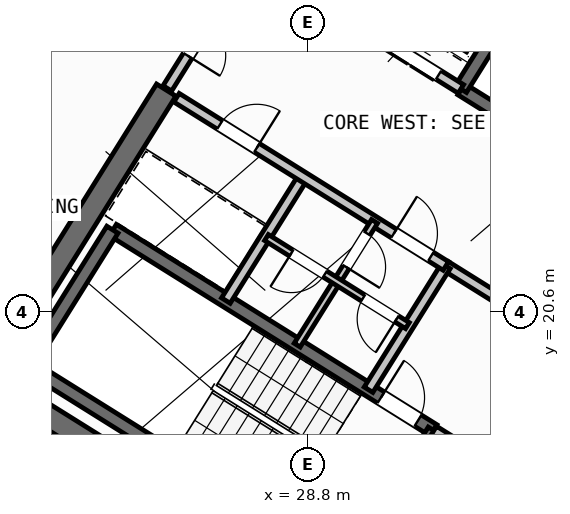
"""IFC4 building model, lengths in metres.
Left out: names, types, materials, properties, quantities, classifications, styles, units other than length and angle.
Written with IfcOpenShell. Run it as: python <this file> out.ifc"""

import sys

from ifc_helpers import new_model, si_unit, direction, frame, frame_2d, origin, place, context, subcontext, project, spatial, rectangle, extrude, source, transform, mapped, element, fill, save


model = new_model("IFC4")
c1 = context("Model", 3, precision=1e-05, world=origin(), true_north=direction((0.0, 1.0)))
c2 = subcontext(c1, "Body", "Model", "MODEL_VIEW")
j1 = project(units=[si_unit("LENGTHUNIT", "METRE"), si_unit("PLANEANGLEUNIT", "RADIAN")], contexts=[c1])
p1 = place(None, origin())
s1 = spatial("IfcSite", under=j1, at=p1, CompositionType="ELEMENT")
p2 = place(p1, origin())
s2 = spatial("IfcBuilding", under=s1, at=p2, CompositionType="ELEMENT")
p3 = place(p2, frame((0.0, 0.0, 259.2)))
s3 = spatial("IfcBuildingStorey", under=s2, at=p3, CompositionType="ELEMENT", Elevation=259.2)
p4 = place(p3, frame((40.531, 24.036, 0.0), z_axis=(0.0, 0.0, 1.0), x_axis=(-0.848048787466, 0.529918157905, 0.0)))
e1 = element("IfcWall", 1, at=p4, inside=s3, PredefinedType="SHEAR", context=c2, shape_type="SweptSolid", body=[
    extrude(rectangle(XDim=13.04, YDim=0.45, at=frame_2d((6.52, 0.0))), origin(), (0.0, 0.0, 1.0), 3.35),
])
p5 = place(p3, frame((33.324, 12.503, 0.0), z_axis=(0.0, 0.0, 1.0), x_axis=(-0.848043529849, 0.529926571782, 0.0)))
e2 = element("IfcWall", 2, at=p5, inside=s3, PredefinedType="SHEAR", context=c2, shape_type="SweptSolid", body=[
    extrude(rectangle(XDim=13.04, YDim=0.45, at=frame_2d((6.52, 0.0))), origin(), (0.0, 0.0, 1.0), 3.35),
])
p6 = place(p3, frame((26.007, 24.976, 0.0), z_axis=(0.0, 0.0, 1.0), x_axis=(-0.529931155655, -0.848040665456, 0.0)))
e3 = element("IfcWall", 3, at=p6, inside=s3, PredefinedType="SHEAR", context=c2, shape_type="SweptSolid", body=[
    extrude(rectangle(XDim=6.475, YDim=0.45, at=frame_2d((3.238, 0.0))), origin(), (0.0, 0.0, 1.0), 3.35),
])
p7 = place(p3, frame((29.268, 6.429, 0.0), z_axis=(0.0, 0.0, 1.0), x_axis=(-0.848049971435, 0.529916263149, 0.0)))
e4 = element("IfcWall", 4, at=p7, inside=s3, PredefinedType="STANDARD", context=c2, shape_type="SweptSolid", body=[
    extrude(rectangle(XDim=31.588, YDim=0.32, at=frame_2d((15.794, 0.0))), origin(), (0.0, 0.0, 1.0), 3.35),
])
p8 = place(p7, frame((16.362, 0.0, 0.0)))
e5 = element("IfcOpeningElement", 5, at=p8, cuts=e4, PredefinedType="OPENING", context=c2, shape_type="SweptSolid", body=[
    extrude(rectangle(XDim=1.2, YDim=2.15, at=frame_2d((0.6, 1.075))), frame((0.0, 0.17, 0.0), z_axis=(0.0, -1.0, 0.0), x_axis=(1.0, 0.0, 0.0)), (0.0, 0.0, 1.0), 0.34),
])
p9 = place(p7, frame((3.859, 0.0, 0.9)))
e6 = element("IfcOpeningElement", 6, at=p9, cuts=e4, PredefinedType="OPENING", context=c2, shape_type="SweptSolid", body=[
    extrude(rectangle(XDim=1.65, YDim=1.45, at=frame_2d((0.825, 0.725))), frame((0.0, 0.17, 0.0), z_axis=(0.0, -1.0, 0.0), x_axis=(1.0, 0.0, 0.0)), (0.0, 0.0, 1.0), 0.34),
])
p10 = place(p7, frame((10.519, 0.0, 0.9)))
e7 = element("IfcOpeningElement", 7, at=p10, cuts=e4, PredefinedType="OPENING", context=c2, shape_type="SweptSolid", body=[
    extrude(rectangle(XDim=1.65, YDim=1.45, at=frame_2d((0.825, 0.725))), frame((0.0, 0.17, 0.0), z_axis=(0.0, -1.0, 0.0), x_axis=(1.0, 0.0, 0.0)), (0.0, 0.0, 1.0), 0.34),
])
p11 = place(p7, frame((28.413, 0.0, 0.95)))
e8 = element("IfcOpeningElement", 8, at=p11, cuts=e4, PredefinedType="OPENING", context=c2, shape_type="SweptSolid", body=[
    extrude(rectangle(XDim=1.95, YDim=1.35, at=frame_2d((0.975, 0.675))), frame((0.0, 0.17, 0.0), z_axis=(0.0, -1.0, 0.0), x_axis=(1.0, 0.0, 0.0)), (0.0, 0.0, 1.0), 0.34),
])
p12 = place(p7, frame((19.699, 0.0, 1.0)))
e9 = element("IfcOpeningElement", 9, at=p12, cuts=e4, PredefinedType="OPENING", context=c2, shape_type="SweptSolid", body=[
    extrude(rectangle(XDim=0.65, YDim=1.15, at=frame_2d((0.325, 0.575))), frame((0.0, 0.17, 0.0), z_axis=(0.0, -1.0, 0.0), x_axis=(1.0, 0.0, 0.0)), (0.0, 0.0, 1.0), 0.34),
])
p13 = place(p7, frame((21.721, 0.0, 1.0)))
e10 = element("IfcOpeningElement", 10, at=p13, cuts=e4, PredefinedType="OPENING", context=c2, shape_type="SweptSolid", body=[
    extrude(rectangle(XDim=0.65, YDim=1.15, at=frame_2d((0.325, 0.575))), frame((0.0, 0.17, 0.0), z_axis=(0.0, -1.0, 0.0), x_axis=(1.0, 0.0, 0.0)), (0.0, 0.0, 1.0), 0.34),
])
p14 = place(p7, frame((23.756, 0.0, 1.0)))
e11 = element("IfcOpeningElement", 11, at=p14, cuts=e4, PredefinedType="OPENING", context=c2, shape_type="SweptSolid", body=[
    extrude(rectangle(XDim=0.65, YDim=1.15, at=frame_2d((0.325, 0.575))), frame((0.0, 0.17, 0.0), z_axis=(0.0, -1.0, 0.0), x_axis=(1.0, 0.0, 0.0)), (0.0, 0.0, 1.0), 0.34),
])
p15 = place(p7, frame((25.791, 0.0, 1.0)))
e12 = element("IfcOpeningElement", 12, at=p15, cuts=e4, PredefinedType="OPENING", context=c2, shape_type="SweptSolid", body=[
    extrude(rectangle(XDim=0.65, YDim=1.15, at=frame_2d((0.325, 0.575))), frame((0.0, 0.17, 0.0), z_axis=(0.0, -1.0, 0.0), x_axis=(1.0, 0.0, 0.0)), (0.0, 0.0, 1.0), 0.34),
])
p16 = place(p3, frame((14.138, 41.825, 0.0), z_axis=(0.0, 0.0, 1.0), x_axis=(0.848046498049, -0.529921821731, 0.0)))
e13 = element("IfcWall", 13, at=p16, inside=s3, PredefinedType="STANDARD", context=c2, shape_type="SweptSolid", body=[
    extrude(rectangle(XDim=31.588, YDim=0.32, at=frame_2d((15.794, 0.0))), origin(), (0.0, 0.0, 1.0), 3.35),
])
p17 = place(p16, frame((9.753, 0.0, 0.0)))
e14 = element("IfcOpeningElement", 14, at=p17, cuts=e13, PredefinedType="OPENING", context=c2, shape_type="SweptSolid", body=[
    extrude(rectangle(XDim=1.05, YDim=2.15, at=frame_2d((0.525, 1.075))), frame((0.0, 0.17, 0.0), z_axis=(0.0, -1.0, 0.0), x_axis=(1.0, 0.0, 0.0)), (0.0, 0.0, 1.0), 0.34),
])
p18 = place(p16, frame((0.816, 0.0, 0.9)))
e15 = element("IfcOpeningElement", 15, at=p18, cuts=e13, PredefinedType="OPENING", context=c2, shape_type="SweptSolid", body=[
    extrude(rectangle(XDim=1.65, YDim=1.45, at=frame_2d((0.825, 0.725))), frame((0.0, 0.17, 0.0), z_axis=(0.0, -1.0, 0.0), x_axis=(1.0, 0.0, 0.0)), (0.0, 0.0, 1.0), 0.34),
])
p19 = place(p16, frame((4.196, 0.0, 1.0)))
e16 = element("IfcOpeningElement", 16, at=p19, cuts=e13, PredefinedType="OPENING", context=c2, shape_type="SweptSolid", body=[
    extrude(rectangle(XDim=0.9, YDim=1.25, at=frame_2d((0.45, 0.625))), frame((0.0, 0.17, 0.0), z_axis=(0.0, -1.0, 0.0), x_axis=(1.0, 0.0, 0.0)), (0.0, 0.0, 1.0), 0.34),
])
p20 = place(p16, frame((7.188, 0.0, 0.95)))
e17 = element("IfcOpeningElement", 17, at=p20, cuts=e13, PredefinedType="OPENING", context=c2, shape_type="SweptSolid", body=[
    extrude(rectangle(XDim=1.95, YDim=1.35, at=frame_2d((0.975, 0.675))), frame((0.0, 0.17, 0.0), z_axis=(0.0, -1.0, 0.0), x_axis=(1.0, 0.0, 0.0)), (0.0, 0.0, 1.0), 0.34),
])
p21 = place(p16, frame((14.124, 0.0, 1.0)))
e18 = element("IfcOpeningElement", 18, at=p21, cuts=e13, PredefinedType="OPENING", context=c2, shape_type="SweptSolid", body=[
    extrude(rectangle(XDim=0.9, YDim=1.25, at=frame_2d((0.45, 0.625))), frame((0.0, 0.17, 0.0), z_axis=(0.0, -1.0, 0.0), x_axis=(1.0, 0.0, 0.0)), (0.0, 0.0, 1.0), 0.34),
])
p22 = place(p16, frame((17.154, 0.0, 1.0)))
e19 = element("IfcOpeningElement", 19, at=p22, cuts=e13, PredefinedType="OPENING", context=c2, shape_type="SweptSolid", body=[
    extrude(rectangle(XDim=0.9, YDim=1.25, at=frame_2d((0.45, 0.625))), frame((0.0, 0.17, 0.0), z_axis=(0.0, -1.0, 0.0), x_axis=(1.0, 0.0, 0.0)), (0.0, 0.0, 1.0), 0.34),
])
p23 = place(p16, frame((21.869, 0.0, 0.9)))
e20 = element("IfcOpeningElement", 20, at=p23, cuts=e13, PredefinedType="OPENING", context=c2, shape_type="SweptSolid", body=[
    extrude(rectangle(XDim=1.35, YDim=1.45, at=frame_2d((0.675, 0.725))), frame((0.0, 0.17, 0.0), z_axis=(0.0, -1.0, 0.0), x_axis=(1.0, 0.0, 0.0)), (0.0, 0.0, 1.0), 0.34),
])
p24 = place(p16, frame((27.569, 0.0, 0.9)))
e21 = element("IfcOpeningElement", 21, at=p24, cuts=e13, PredefinedType="OPENING", context=c2, shape_type="SweptSolid", body=[
    extrude(rectangle(XDim=1.35, YDim=1.45, at=frame_2d((0.675, 0.725))), frame((0.0, 0.17, 0.0), z_axis=(0.0, -1.0, 0.0), x_axis=(1.0, 0.0, 0.0)), (0.0, 0.0, 1.0), 0.34),
])
p25 = place(p3, frame((29.605, 15.581, 0.0), z_axis=(0.0, 0.0, 1.0), x_axis=(-0.848036911448, 0.529937163087, 0.0)))
e22 = element("IfcWall", 22, at=p25, inside=s3, PredefinedType="SHEAR", context=c2, shape_type="SweptSolid", body=[
    extrude(rectangle(XDim=7.46, YDim=0.26, at=frame_2d((3.73, 0.0))), origin(), (0.0, 0.0, 1.0), 3.35),
])
p26 = place(p3, frame((31.28, 18.261, 0.0), z_axis=(0.0, 0.0, 1.0), x_axis=(-0.848051618787, 0.529913626805, 0.0)))
e23 = element("IfcWall", 23, at=p26, inside=s3, PredefinedType="SHEAR", context=c2, shape_type="SweptSolid", body=[
    extrude(rectangle(XDim=7.46, YDim=0.26, at=frame_2d((3.73, 0.0))), origin(), (0.0, 0.0, 1.0), 3.35),
])
p27 = place(p26, frame((0.36, 0.0, 0.0)))
e24 = element("IfcOpeningElement", 24, at=p27, cuts=e23, PredefinedType="OPENING", context=c2, shape_type="SweptSolid", body=[
    extrude(rectangle(XDim=0.86, YDim=2.05, at=frame_2d((0.43, 1.025))), frame((0.0, 0.14, 0.0), z_axis=(0.0, -1.0, 0.0), x_axis=(1.0, 0.0, 0.0)), (0.0, 0.0, 1.0), 0.28),
])
p28 = place(p3, frame((31.288, 18.256, 0.0), z_axis=(0.0, 0.0, 1.0), x_axis=(-0.529943379326, -0.848033026897, 0.0)))
e25 = element("IfcWall", 25, at=p28, inside=s3, PredefinedType="SHEAR", context=c2, shape_type="SweptSolid", body=[
    extrude(rectangle(XDim=3.16, YDim=0.26, at=frame_2d((1.58, 0.0))), origin(), (0.0, 0.0, 1.0), 3.35),
])
p29 = place(p3, frame((24.945, 22.22, 0.0), z_axis=(0.0, 0.0, 1.0), x_axis=(-0.529908658664, -0.84805472316, 0.0)))
e26 = element("IfcWall", 26, at=p29, inside=s3, PredefinedType="SHEAR", context=c2, shape_type="SweptSolid", body=[
    extrude(rectangle(XDim=3.16, YDim=0.26, at=frame_2d((1.58, 0.0))), origin(), (0.0, 0.0, 1.0), 3.35),
])
p30 = place(p3, frame((38.046, 21.108, 0.0), z_axis=(0.0, 0.0, 1.0), x_axis=(-0.848054434086, 0.529909121291, 0.0)))
e27 = element("IfcWall", 27, at=p30, inside=s3, PredefinedType="SHEAR", context=c2, shape_type="SweptSolid", body=[
    extrude(rectangle(XDim=7.33, YDim=0.26, at=frame_2d((3.665, 0.0))), origin(), (0.0, 0.0, 1.0), 3.35),
])
p31 = place(p30, frame((0.22, 0.0, 0.0)))
e28 = element("IfcOpeningElement", 28, at=p31, cuts=e27, PredefinedType="OPENING", context=c2, shape_type="SweptSolid", body=[
    extrude(rectangle(XDim=1.1, YDim=2.1, at=frame_2d((0.55, 1.05))), frame((0.0, 0.14, 0.0), z_axis=(0.0, -1.0, 0.0), x_axis=(1.0, 0.0, 0.0)), (0.0, 0.0, 1.0), 0.28),
])
p32 = place(p3, frame((33.496, 27.677, 0.0), z_axis=(0.0, 0.0, 1.0), x_axis=(-0.529908658664, -0.84805472316, 0.0)))
e29 = element("IfcWall", 29, at=p32, inside=s3, PredefinedType="SHEAR", context=c2, shape_type="SweptSolid", body=[
    extrude(rectangle(XDim=3.16, YDim=0.26, at=frame_2d((1.58, 0.0))), origin(), (0.0, 0.0, 1.0), 3.35),
])
p33 = place(p3, frame((34.933, 15.978, 0.0), z_axis=(0.0, 0.0, 1.0), x_axis=(-0.848055739377, 0.529907032327, 0.0)))
e30 = element("IfcWall", 30, at=p33, inside=s3, PredefinedType="STANDARD", context=c2, shape_type="SweptSolid", body=[
    extrude(rectangle(XDim=4.298, YDim=0.2, at=frame_2d((2.149, 0.0))), origin(), (0.0, 0.0, 1.0), 3.34),
])
p34 = place(p33, frame((0.448, 0.0, 0.0)))
e31 = element("IfcOpeningElement", 31, at=p34, cuts=e30, PredefinedType="OPENING", context=c2, shape_type="SweptSolid", body=[
    extrude(rectangle(XDim=1.3, YDim=2.2, at=frame_2d((0.65, 1.1))), frame((0.0, 0.11, 0.0), z_axis=(0.0, -1.0, 0.0), x_axis=(1.0, 0.0, 0.0)), (0.0, 0.0, 1.0), 0.22),
])
p35 = place(p33, frame((2.523, 0.0, 0.0)))
e32 = element("IfcOpeningElement", 32, at=p35, cuts=e30, PredefinedType="OPENING", context=c2, shape_type="SweptSolid", body=[
    extrude(rectangle(XDim=1.45, YDim=2.25, at=frame_2d((0.725, 1.125))), frame((0.0, 0.11, 0.0), z_axis=(0.0, -1.0, 0.0), x_axis=(1.0, 0.0, 0.0)), (0.0, 0.0, 1.0), 0.22),
])
p36 = place(p3, frame((36.459, 18.421, 0.0), z_axis=(0.0, 0.0, 1.0), x_axis=(-0.848059591691, 0.529900867089, 0.0)))
e33 = element("IfcWall", 33, at=p36, inside=s3, PredefinedType="STANDARD", context=c2, shape_type="SweptSolid", body=[
    extrude(rectangle(XDim=5.818, YDim=0.2, at=frame_2d((2.909, 0.0))), origin(), (0.0, 0.0, 1.0), 3.34),
])
p37 = place(p36, frame((2.598, 0.0, 0.0)))
e34 = element("IfcOpeningElement", 34, at=p37, cuts=e33, PredefinedType="OPENING", context=c2, shape_type="SweptSolid", body=[
    extrude(rectangle(XDim=1.15, YDim=2.1, at=frame_2d((0.575, 1.05))), frame((0.0, 0.11, 0.0), z_axis=(0.0, -1.0, 0.0), x_axis=(1.0, 0.0, 0.0)), (0.0, 0.0, 1.0), 0.22),
])
p38 = place(p3, frame((31.822, 24.998, 0.0), z_axis=(0.0, 0.0, 1.0), x_axis=(-0.848054125777, 0.529909614701, 0.0)))
e35 = element("IfcWall", 35, at=p38, inside=s3, PredefinedType="STANDARD", context=c2, shape_type="SweptSolid", body=[
    extrude(rectangle(XDim=4.668, YDim=0.2, at=frame_2d((2.334, 0.0))), origin(), (0.0, 0.0, 1.0), 3.34),
])
p39 = place(p38, frame((0.52, 0.0, 0.0)))
e36 = element("IfcOpeningElement", 36, at=p39, cuts=e35, PredefinedType="OPENING", context=c2, shape_type="SweptSolid", body=[
    extrude(rectangle(XDim=1.2, YDim=2.15, at=frame_2d((0.6, 1.075))), frame((0.0, 0.11, 0.0), z_axis=(0.0, -1.0, 0.0), x_axis=(1.0, 0.0, 0.0)), (0.0, 0.0, 1.0), 0.22),
])
p40 = place(p38, frame((2.54, 0.0, 0.0)))
e37 = element("IfcOpeningElement", 37, at=p40, cuts=e35, PredefinedType="OPENING", context=c2, shape_type="SweptSolid", body=[
    extrude(rectangle(XDim=1.2, YDim=2.15, at=frame_2d((0.6, 1.075))), frame((0.0, 0.11, 0.0), z_axis=(0.0, -1.0, 0.0), x_axis=(1.0, 0.0, 0.0)), (0.0, 0.0, 1.0), 0.22),
])
for number, where, z_axis, x_axis in (
    (38, (31.525, 21.504, 0.0), (0.0, 0.0, 1.0), (-0.53, -0.848, 0.0)),
    (39, (28.71, 23.263, 0.0), (0.0, 0.0, 1.0), (-0.53, -0.848, 0.0)),
):
    element("IfcWall", number, at=place(p3, frame(where, z_axis=z_axis, x_axis=x_axis)), inside=s3, PredefinedType="STANDARD", context=c2, shape_type="SweptSolid", body=[
        extrude(rectangle(XDim=2.88, YDim=0.2, at=frame_2d((1.44, 0.0))), origin(), (0.0, 0.0, 1.0), 3.34),
    ])
p41 = place(p3, frame((31.525, 21.504, 0.0), z_axis=(0.0, 0.0, 1.0), x_axis=(-0.848042066329, 0.529928913853, 0.0)))
e40 = element("IfcWall", 40, at=p41, inside=s3, PredefinedType="STANDARD", context=c2, shape_type="SweptSolid", body=[
    extrude(rectangle(XDim=6.268, YDim=0.2, at=frame_2d((3.134, 0.0))), origin(), (0.0, 0.0, 1.0), 3.34),
])
p42 = place(p41, frame((4.4, 0.0, 0.0)))
e41 = element("IfcOpeningElement", 41, at=p42, cuts=e40, PredefinedType="OPENING", context=c2, shape_type="SweptSolid", body=[
    extrude(rectangle(XDim=0.86, YDim=2.05, at=frame_2d((0.43, 1.025))), frame((0.0, 0.11, 0.0), z_axis=(0.0, -1.0, 0.0), x_axis=(1.0, 0.0, 0.0)), (0.0, 0.0, 1.0), 0.22),
])
p43 = place(p41, frame((0.35, 0.0, 0.0)))
e42 = element("IfcOpeningElement", 42, at=p43, cuts=e40, PredefinedType="OPENING", context=c2, shape_type="SweptSolid", body=[
    extrude(rectangle(XDim=0.86, YDim=2.05, at=frame_2d((0.43, 1.025))), frame((0.0, 0.11, 0.0), z_axis=(0.0, -1.0, 0.0), x_axis=(1.0, 0.0, 0.0)), (0.0, 0.0, 1.0), 0.22),
])
p44 = place(p3, frame((30.117, 22.384, 0.0), z_axis=(0.0, 0.0, 1.0), x_axis=(-0.529951914384, -0.848027693204, 0.0)))
e43 = element("IfcWall", 43, at=p44, inside=s3, PredefinedType="PLUMBINGWALL", context=c2, shape_type="SweptSolid", body=[
    extrude(rectangle(XDim=1.4, YDim=0.14, at=frame_2d((0.7, 0.0))), origin(), (0.0, 0.0, 1.0), 3.34),
])
p45 = place(p44, frame((0.28, 0.0, 0.0)))
e44 = element("IfcOpeningElement", 44, at=p45, cuts=e43, PredefinedType="OPENING", context=c2, shape_type="SweptSolid", body=[
    extrude(rectangle(XDim=0.78, YDim=2.05, at=frame_2d((0.39, 1.025))), frame((0.0, 0.08, 0.0), z_axis=(0.0, -1.0, 0.0), x_axis=(1.0, 0.0, 0.0)), (0.0, 0.0, 1.0), 0.16),
])
p46 = place(p3, frame((29.375, 21.196, 0.0), z_axis=(0.0, 0.0, 1.0), x_axis=(-0.529865479138, -0.848081702443, 0.0)))
e45 = element("IfcWall", 45, at=p46, inside=s3, PredefinedType="PLUMBINGWALL", context=c2, shape_type="SweptSolid", body=[
    extrude(rectangle(XDim=1.48, YDim=0.14, at=frame_2d((0.74, 0.0))), origin(), (0.0, 0.0, 1.0), 3.34),
])
p47 = place(p3, frame((30.766, 20.327, 0.0), z_axis=(0.0, 0.0, 1.0), x_axis=(-0.848052663127, 0.529911955482, 0.0)))
e46 = element("IfcWall", 46, at=p47, inside=s3, PredefinedType="PLUMBINGWALL", context=c2, shape_type="SweptSolid", body=[
    extrude(rectangle(XDim=3.28, YDim=0.14, at=frame_2d((1.64, 0.0))), origin(), (0.0, 0.0, 1.0), 3.34),
])
p48 = place(p47, frame((0.25, 0.0, 0.0)))
e47 = element("IfcOpeningElement", 47, at=p48, cuts=e46, PredefinedType="OPENING", context=c2, shape_type="SweptSolid", body=[
    extrude(rectangle(XDim=0.78, YDim=2.05, at=frame_2d((0.39, 1.025))), frame((0.0, 0.08, 0.0), z_axis=(0.0, -1.0, 0.0), x_axis=(1.0, 0.0, 0.0)), (0.0, 0.0, 1.0), 0.16),
])
p49 = place(p47, frame((1.92, 0.0, 0.0)))
e48 = element("IfcOpeningElement", 48, at=p49, cuts=e46, PredefinedType="OPENING", context=c2, shape_type="SweptSolid", body=[
    extrude(rectangle(XDim=0.78, YDim=2.05, at=frame_2d((0.39, 1.025))), frame((0.0, 0.08, 0.0), z_axis=(0.0, -1.0, 0.0), x_axis=(1.0, 0.0, 0.0)), (0.0, 0.0, 1.0), 0.16),
])
p50 = place(p3, frame((27.596, 27.52, 0.0), z_axis=(0.0, 0.0, 1.0), x_axis=(-0.529865479138, -0.848081702443, 0.0)))
e49 = element("IfcWall", 49, at=p50, inside=s3, PredefinedType="STANDARD", context=c2, shape_type="SweptSolid", body=[
    extrude(rectangle(XDim=2.96, YDim=0.2, at=frame_2d((1.48, 0.0))), origin(), (0.0, 0.0, 1.0), 3.34),
])
p51 = place(p50, frame((0.7, 0.0, 0.0)))
e50 = element("IfcOpeningElement", 50, at=p51, cuts=e49, PredefinedType="OPENING", context=c2, shape_type="SweptSolid", body=[
    extrude(rectangle(XDim=1.5, YDim=2.15, at=frame_2d((0.75, 1.075))), frame((0.0, 0.11, 0.0), z_axis=(0.0, -1.0, 0.0), x_axis=(1.0, 0.0, 0.0)), (0.0, 0.0, 1.0), 0.22),
])
p52 = place(p3, frame((23.899, 26.529, 0.0), z_axis=(0.0, 0.0, 1.0), x_axis=(-0.529917716469, -0.848049063305, 0.0)))
e51 = element("IfcWall", 51, at=p52, inside=s3, PredefinedType="PARTITIONING", context=c2, shape_type="SweptSolid", body=[
    extrude(rectangle(XDim=14.05, YDim=0.16, at=frame_2d((7.025, 0.0))), origin(), (0.0, 0.0, 1.0), 3.34),
])
p53 = place(p3, frame((32.164, 10.374, 0.0), z_axis=(0.0, 0.0, 1.0), x_axis=(-0.848044107957, 0.529925646633, 0.0)))
e52 = element("IfcWall", 52, at=p53, inside=s3, PredefinedType="PARTITIONING", context=c2, shape_type="SweptSolid", body=[
    extrude(rectangle(XDim=15.57, YDim=0.16, at=frame_2d((7.785, 0.0))), origin(), (0.0, 0.0, 1.0), 3.34),
])
p54 = place(p53, frame((10.83, 0.0, 0.0)))
e53 = element("IfcOpeningElement", 53, at=p54, cuts=e52, PredefinedType="OPENING", context=c2, shape_type="SweptSolid", body=[
    extrude(rectangle(XDim=1.0, YDim=2.1, at=frame_2d((0.5, 1.05))), frame((0.0, 0.09, 0.0), z_axis=(0.0, -1.0, 0.0), x_axis=(1.0, 0.0, 0.0)), (0.0, 0.0, 1.0), 0.18),
])
m1 = source(origin(), c2, "Body", "SweptSolid", [
    extrude(rectangle(XDim=0.86, YDim=2.05, at=frame_2d((0.43, 1.025))), frame((0.0, 0.025, 0.0), z_axis=(0.0, -1.0, 0.0), x_axis=(1.0, 0.0, 0.0)), (0.0, 0.0, 1.0), 0.05),
])
p55 = place(p27, frame((0.86, 0.0, 0.0), z_axis=(0.0, 0.0, 1.0), x_axis=(-1.0, 0.0, 0.0)))
e54 = element("IfcDoor", 54, at=p55, inside=s3, OperationType="SINGLE_SWING_LEFT", PredefinedType="DOOR", context=c2, shape_type="MappedRepresentation", body=[
    mapped(m1, transform((0.0, 0.0, 0.0), scale=1.0)),
])
fill(e24, e54)
m2 = source(origin(), c2, "Body", "SweptSolid", [
    extrude(rectangle(XDim=1.2, YDim=2.15, at=frame_2d((0.6, 1.075))), frame((0.0, 0.025, 0.0), z_axis=(0.0, -1.0, 0.0), x_axis=(1.0, 0.0, 0.0)), (0.0, 0.0, 1.0), 0.05),
])
p56 = place(p39, origin())
e55 = element("IfcDoor", 55, at=p56, inside=s3, OperationType="DOUBLE_DOOR_SLIDING", PredefinedType="DOOR", context=c2, shape_type="MappedRepresentation", body=[
    mapped(m2, transform((0.0, 0.0, 0.0), scale=1.0)),
])
fill(e36, e55)
p57 = place(p42, frame((0.86, 0.0, 0.0), z_axis=(0.0, 0.0, 1.0), x_axis=(-1.0, 0.0, 0.0)))
e56 = element("IfcDoor", 56, at=p57, inside=s3, OperationType="SINGLE_SWING_RIGHT", PredefinedType="DOOR", context=c2, shape_type="MappedRepresentation", body=[
    mapped(m1, transform((0.0, 0.0, 0.0), scale=1.0)),
])
fill(e41, e56)
p58 = place(p43, frame((0.86, 0.0, 0.0), z_axis=(0.0, 0.0, 1.0), x_axis=(-1.0, 0.0, 0.0)))
e57 = element("IfcDoor", 57, at=p58, inside=s3, OperationType="SINGLE_SWING_LEFT", PredefinedType="DOOR", context=c2, shape_type="MappedRepresentation", body=[
    mapped(m1, transform((0.0, 0.0, 0.0), scale=1.0)),
])
fill(e42, e57)
m3 = source(origin(), c2, "Body", "SweptSolid", [
    extrude(rectangle(XDim=0.78, YDim=2.05, at=frame_2d((0.39, 1.025))), frame((0.0, 0.025, 0.0), z_axis=(0.0, -1.0, 0.0), x_axis=(1.0, 0.0, 0.0)), (0.0, 0.0, 1.0), 0.05),
])
p59 = place(p45, origin())
e58 = element("IfcDoor", 58, at=p59, inside=s3, OperationType="SINGLE_SWING_RIGHT", PredefinedType="DOOR", context=c2, shape_type="MappedRepresentation", body=[
    mapped(m3, transform((0.0, 0.0, 0.0), scale=1.0)),
])
fill(e44, e58)
p60 = place(p48, origin())
e59 = element("IfcDoor", 59, at=p60, inside=s3, OperationType="SINGLE_SWING_LEFT", PredefinedType="DOOR", context=c2, shape_type="MappedRepresentation", body=[
    mapped(m3, transform((0.0, 0.0, 0.0), scale=1.0)),
])
fill(e47, e59)
p61 = place(p49, origin())
e60 = element("IfcDoor", 60, at=p61, inside=s3, OperationType="SINGLE_SWING_RIGHT", PredefinedType="DOOR", context=c2, shape_type="MappedRepresentation", body=[
    mapped(m3, transform((0.0, 0.0, 0.0), scale=1.0)),
])
fill(e48, e60)
m4 = source(origin(), c2, "Body", "SweptSolid", [
    extrude(rectangle(XDim=1.5, YDim=2.15, at=frame_2d((0.75, 1.075))), frame((0.0, 0.025, 0.0), z_axis=(0.0, -1.0, 0.0), x_axis=(1.0, 0.0, 0.0)), (0.0, 0.0, 1.0), 0.05),
])
p62 = place(p51, origin())
e61 = element("IfcDoor", 61, at=p62, inside=s3, OperationType="DOUBLE_DOOR_SINGLE_SWING", PredefinedType="DOOR", context=c2, shape_type="MappedRepresentation", body=[
    mapped(m4, transform((0.0, 0.0, 0.0), scale=1.0)),
])
fill(e50, e61)
save(model, sys.argv[1])
